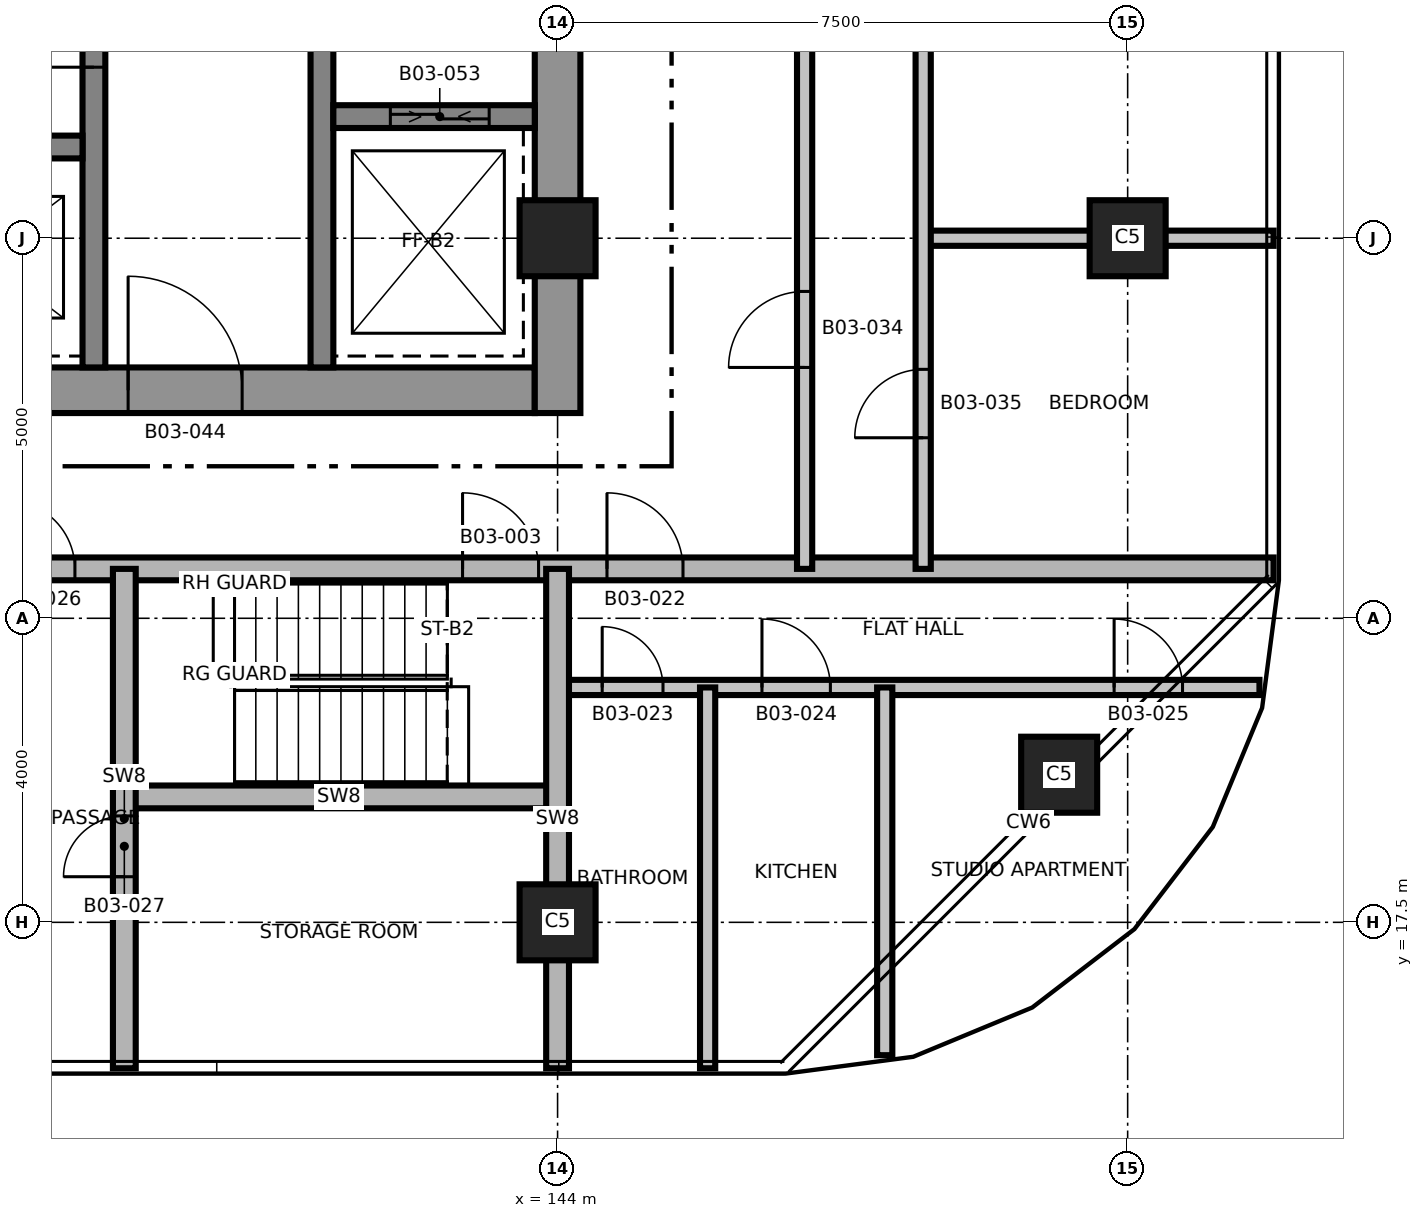
"""IFC4 building model, lengths in metres.
Left out: names, types, materials, properties, quantities, classifications, styles, units other than length and angle.
Written with IfcOpenShell. Run it as: python <this file> out.ifc"""

import sys

from ifc_helpers import new_model, si_unit, direction, frame, frame_2d, origin, origin_2d, place, context, subcontext, project, spatial, rectangle, extrude, element, fill, save


model = new_model("IFC4")
c1 = context("Model", 3, precision=1e-05, world=origin(), true_north=direction((0.0, 1.0)))
c2 = subcontext(c1, "Body", "Model", "MODEL_VIEW")
j1 = project(units=[si_unit("LENGTHUNIT", "METRE"), si_unit("PLANEANGLEUNIT", "RADIAN")], contexts=[c1])
p1 = place(None, origin())
s1 = spatial("IfcSite", under=j1, at=p1, CompositionType="ELEMENT")
p2 = place(p1, origin())
s2 = spatial("IfcBuilding", under=s1, at=p2, CompositionType="ELEMENT")
p3 = place(p2, frame((0.0, 0.0, 55.7)))
s3 = spatial("IfcBuildingStorey", under=s2, at=p3, CompositionType="ELEMENT", Elevation=55.7)
p4 = place(p3, frame((128.7, 24.5, 0.0), z_axis=(0.0, 0.0, 1.0), x_axis=(1.0, 0.0, 0.0)))
e1 = element("IfcWall", 1, at=p4, inside=s3, PredefinedType="SHEAR", context=c2, shape_type="SweptSolid", body=[
    extrude(rectangle(XDim=15.0, YDim=0.6, at=frame_2d((7.5, 0.0))), origin(), (0.0, 0.0, 1.0), 3.7),
])
p5 = place(p4, frame((9.65, 0.0, 0.0)))
e2 = element("IfcOpeningElement", 2, at=p5, cuts=e1, PredefinedType="OPENING", context=c2, shape_type="SweptSolid", body=[
    extrude(rectangle(XDim=1.5, YDim=2.1, at=frame_2d((0.75, 1.05))), frame((0.0, 0.31, 0.0), z_axis=(0.0, -1.0, 0.0), x_axis=(1.0, 0.0, 0.0)), (0.0, 0.0, 1.0), 0.62),
])
p6 = place(p4, frame((1.25, 0.0, 0.0)))
e3 = element("IfcOpeningElement", 3, at=p6, cuts=e1, PredefinedType="OPENING", context=c2, shape_type="SweptSolid", body=[
    extrude(rectangle(XDim=0.9, YDim=2.1, at=frame_2d((0.45, 1.05))), frame((0.0, 0.31, 0.0), z_axis=(0.0, -1.0, 0.0), x_axis=(1.0, 0.0, 0.0)), (0.0, 0.0, 1.0), 0.62),
])
p7 = place(p3, frame((144.0, 24.2, 0.0), z_axis=(0.0, 0.0, 1.0), x_axis=(0.0, 1.0, 0.0)))
e4 = element("IfcWall", 4, at=p7, inside=s3, PredefinedType="SHEAR", context=c2, shape_type="SweptSolid", body=[
    extrude(rectangle(XDim=13.6, YDim=0.6, at=frame_2d((6.8, 0.0))), origin(), (0.0, 0.0, 1.0), 3.7),
])
p8 = place(p3, frame((137.9, 24.8, 0.0), z_axis=(0.0, 0.0, 1.0), x_axis=(0.0, 1.0, 0.0)))
e5 = element("IfcWall", 5, at=p8, inside=s3, PredefinedType="SHEAR", context=c2, shape_type="SweptSolid", body=[
    extrude(rectangle(XDim=12.4, YDim=0.3, at=frame_2d((6.2, 0.0))), origin(), (0.0, 0.0, 1.0), 3.7),
])
p9 = place(p8, frame((3.95, 0.0, 0.0)))
e6 = element("IfcOpeningElement", 6, at=p9, cuts=e5, PredefinedType="OPENING", context=c2, shape_type="SweptSolid", body=[
    extrude(rectangle(XDim=1.5, YDim=2.1, at=frame_2d((0.75, 1.05))), frame((0.0, 0.16, 0.0), z_axis=(0.0, -1.0, 0.0), x_axis=(1.0, 0.0, 0.0)), (0.0, 0.0, 1.0), 0.32),
])
p10 = place(p8, frame((10.45, 0.0, 0.0)))
e7 = element("IfcOpeningElement", 7, at=p10, cuts=e5, PredefinedType="OPENING", context=c2, shape_type="SweptSolid", body=[
    extrude(rectangle(XDim=0.9, YDim=2.1, at=frame_2d((0.45, 1.05))), frame((0.0, 0.16, 0.0), z_axis=(0.0, -1.0, 0.0), x_axis=(1.0, 0.0, 0.0)), (0.0, 0.0, 1.0), 0.32),
])
p11 = place(p3, frame((140.9, 24.8, 0.0), z_axis=(0.0, 0.0, 1.0), x_axis=(0.0, 1.0, 0.0)))
e8 = element("IfcWall", 8, at=p11, inside=s3, PredefinedType="SHEAR", context=c2, shape_type="SweptSolid", body=[
    extrude(rectangle(XDim=12.4, YDim=0.3, at=frame_2d((6.2, 0.0))), origin(), (0.0, 0.0, 1.0), 3.7),
])
p12 = place(p11, frame((5.9, 0.0, 0.0)))
e9 = element("IfcOpeningElement", 9, at=p12, cuts=e8, PredefinedType="OPENING", context=c2, shape_type="SweptSolid", body=[
    extrude(rectangle(XDim=1.2, YDim=2.1, at=frame_2d((0.6, 1.05))), frame((0.0, 0.16, 0.0), z_axis=(0.0, -1.0, 0.0), x_axis=(1.0, 0.0, 0.0)), (0.0, 0.0, 1.0), 0.32),
])
p13 = place(p3, frame((132.25, 27.7, 0.0), z_axis=(0.0, 0.0, 1.0), x_axis=(1.0, 0.0, 0.0)))
e10 = element("IfcWall", 10, at=p13, inside=s3, PredefinedType="SHEAR", context=c2, shape_type="SweptSolid", body=[
    extrude(rectangle(XDim=5.5, YDim=0.3, at=frame_2d((2.75, 0.0))), origin(), (0.0, 0.0, 1.0), 3.7),
])
p14 = place(p13, frame((0.9, 0.0, 0.0)))
e11 = element("IfcOpeningElement", 11, at=p14, cuts=e10, PredefinedType="OPENING", context=c2, shape_type="SweptSolid", body=[
    extrude(rectangle(XDim=1.1, YDim=2.4, at=frame_2d((0.55, 1.2))), frame((0.0, 0.16, 0.0), z_axis=(0.0, -1.0, 0.0), x_axis=(1.0, 0.0, 0.0)), (0.0, 0.0, 1.0), 0.32),
])
p15 = place(p13, frame((3.8, 0.0, 0.0)))
e12 = element("IfcOpeningElement", 12, at=p15, cuts=e10, PredefinedType="OPENING", context=c2, shape_type="SweptSolid", body=[
    extrude(rectangle(XDim=1.1, YDim=2.4, at=frame_2d((0.55, 1.2))), frame((0.0, 0.16, 0.0), z_axis=(0.0, -1.0, 0.0), x_axis=(1.0, 0.0, 0.0)), (0.0, 0.0, 1.0), 0.32),
])
p16 = place(p3, frame((141.05, 28.1, 0.0), z_axis=(0.0, 0.0, 1.0), x_axis=(1.0, 0.0, 0.0)))
e13 = element("IfcWall", 13, at=p16, inside=s3, PredefinedType="SHEAR", context=c2, shape_type="SweptSolid", body=[
    extrude(rectangle(XDim=2.65, YDim=0.3, at=frame_2d((1.325, 0.0))), origin(), (0.0, 0.0, 1.0), 3.7),
])
p17 = place(p16, frame((0.75, 0.0, 0.0)))
e14 = element("IfcOpeningElement", 14, at=p17, cuts=e13, PredefinedType="OPENING", context=c2, shape_type="SweptSolid", body=[
    extrude(rectangle(XDim=1.3, YDim=2.4, at=frame_2d((0.65, 1.2))), frame((0.0, 0.16, 0.0), z_axis=(0.0, -1.0, 0.0), x_axis=(1.0, 0.0, 0.0)), (0.0, 0.0, 1.0), 0.32),
])
for number, where, z_axis, x_axis in (
    (15, (144.0, 17.5, 0.0), (0.0, 0.0, 1.0), (1.0, 0.0, 0.0)),
    (16, (150.599, 19.442, 0.0), (0.0, 0.0, 1.0), (1.0, 0.0, 0.0)),
    (17, (144.0, 26.5, 0.0), (0.0, 0.0, 1.0), (1.0, 0.0, 0.0)),
    (18, (151.5, 26.5, 0.0), (0.0, 0.0, 1.0), (1.0, 0.0, 0.0)),
):
    element("IfcColumn", number, at=place(p3, frame(where, z_axis=z_axis, x_axis=x_axis)), inside=s3, PredefinedType="COLUMN", context=c2, shape_type="SweptSolid", body=[
        extrude(rectangle(XDim=1.0, YDim=1.0, at=origin_2d()), origin(), (0.0, 0.0, 1.0), 3.7),
    ])
p18 = place(p3, frame((138.25, 19.15, 0.0), z_axis=(0.0, 0.0, 1.0), x_axis=(1.0, 0.0, 0.0)))
e19 = element("IfcWall", 19, at=p18, inside=s3, PredefinedType="SHEAR", context=c2, shape_type="SweptSolid", body=[
    extrude(rectangle(XDim=5.75, YDim=0.3, at=frame_2d((2.875, 0.0))), origin(), (0.0, 0.0, 1.0), 3.4),
])
p19 = place(p3, frame((144.0, 20.59, 0.0), z_axis=(0.0, 0.0, 1.0), x_axis=(1.0, 0.0, 0.0)))
e20 = element("IfcWall", 20, at=p19, inside=s3, PredefinedType="PARTITIONING", context=c2, shape_type="SweptSolid", body=[
    extrude(rectangle(XDim=9.234, YDim=0.2, at=frame_2d((4.617, 0.0))), origin(), (0.0, 0.0, 1.0), 3.4),
])
p20 = place(p19, frame((0.587, 0.0, 0.0)))
e21 = element("IfcOpeningElement", 21, at=p20, cuts=e20, PredefinedType="OPENING", context=c2, shape_type="SweptSolid", body=[
    extrude(rectangle(XDim=0.8, YDim=2.1, at=frame_2d((0.4, 1.05))), frame((0.0, 0.11, 0.0), z_axis=(0.0, -1.0, 0.0), x_axis=(1.0, 0.0, 0.0)), (0.0, 0.0, 1.0), 0.22),
])
p21 = place(p19, frame((2.689, 0.0, 0.0)))
e22 = element("IfcOpeningElement", 22, at=p21, cuts=e20, PredefinedType="OPENING", context=c2, shape_type="SweptSolid", body=[
    extrude(rectangle(XDim=0.9, YDim=2.1, at=frame_2d((0.45, 1.05))), frame((0.0, 0.11, 0.0), z_axis=(0.0, -1.0, 0.0), x_axis=(1.0, 0.0, 0.0)), (0.0, 0.0, 1.0), 0.22),
])
p22 = place(p19, frame((7.322, 0.0, 0.0)))
e23 = element("IfcOpeningElement", 23, at=p22, cuts=e20, PredefinedType="OPENING", context=c2, shape_type="SweptSolid", body=[
    extrude(rectangle(XDim=0.9, YDim=2.1, at=frame_2d((0.45, 1.05))), frame((0.0, 0.11, 0.0), z_axis=(0.0, -1.0, 0.0), x_axis=(1.0, 0.0, 0.0)), (0.0, 0.0, 1.0), 0.22),
])
p23 = place(p3, frame((119.58, 22.15, 0.0), z_axis=(0.0, 0.0, 1.0), x_axis=(1.0, 0.0, 0.0)))
e24 = element("IfcWall", 24, at=p23, inside=s3, PredefinedType="SHEAR", context=c2, shape_type="SweptSolid", body=[
    extrude(rectangle(XDim=33.84, YDim=0.3, at=frame_2d((16.92, 0.0))), origin(), (0.0, 0.0, 1.0), 3.4),
])
p24 = place(p23, frame((23.17, 0.0, 0.0)))
e25 = element("IfcOpeningElement", 25, at=p24, cuts=e24, PredefinedType="OPENING", context=c2, shape_type="SweptSolid", body=[
    extrude(rectangle(XDim=1.0, YDim=2.1, at=frame_2d((0.5, 1.05))), frame((0.0, 0.16, 0.0), z_axis=(0.0, -1.0, 0.0), x_axis=(1.0, 0.0, 0.0)), (0.0, 0.0, 1.0), 0.32),
])
p25 = place(p23, frame((11.52, 0.0, 0.0)))
e26 = element("IfcOpeningElement", 26, at=p25, cuts=e24, PredefinedType="OPENING", context=c2, shape_type="SweptSolid", body=[
    extrude(rectangle(XDim=1.0, YDim=2.1, at=frame_2d((0.5, 1.05))), frame((0.0, 0.16, 0.0), z_axis=(0.0, -1.0, 0.0), x_axis=(1.0, 0.0, 0.0)), (0.0, 0.0, 1.0), 0.32),
])
p26 = place(p23, frame((25.07, 0.0, 0.0)))
e27 = element("IfcOpeningElement", 27, at=p26, cuts=e24, PredefinedType="OPENING", context=c2, shape_type="SweptSolid", body=[
    extrude(rectangle(XDim=1.0, YDim=2.1, at=frame_2d((0.5, 1.05))), frame((0.0, 0.16, 0.0), z_axis=(0.0, -1.0, 0.0), x_axis=(1.0, 0.0, 0.0)), (0.0, 0.0, 1.0), 0.32),
])
p27 = place(p23, frame((17.17, 0.0, 0.0)))
e28 = element("IfcOpeningElement", 28, at=p27, cuts=e24, PredefinedType="OPENING", context=c2, shape_type="SweptSolid", body=[
    extrude(rectangle(XDim=0.9, YDim=2.1, at=frame_2d((0.45, 1.05))), frame((0.0, 0.16, 0.0), z_axis=(0.0, -1.0, 0.0), x_axis=(1.0, 0.0, 0.0)), (0.0, 0.0, 1.0), 0.32),
])
p28 = place(p3, frame((148.81, 26.5, 0.0), z_axis=(0.0, 0.0, 1.0), x_axis=(1.0, 0.0, 0.0)))
e29 = element("IfcWall", 29, at=p28, inside=s3, PredefinedType="PARTITIONING", context=c2, shape_type="SweptSolid", body=[
    extrude(rectangle(XDim=4.61, YDim=0.2, at=frame_2d((2.305, 0.0))), origin(), (0.0, 0.0, 1.0), 3.4),
])
p29 = place(p3, frame((138.3, 15.58, 0.0), z_axis=(0.0, 0.0, 1.0), x_axis=(0.0, 1.0, 0.0)))
e30 = element("IfcWall", 30, at=p29, inside=s3, PredefinedType="SHEAR", context=c2, shape_type="SweptSolid", body=[
    extrude(rectangle(XDim=6.57, YDim=0.3, at=frame_2d((3.285, 0.0))), origin(), (0.0, 0.0, 1.0), 3.4),
])
p30 = place(p29, frame((2.52, 0.0, 0.0)))
e31 = element("IfcOpeningElement", 31, at=p30, cuts=e30, PredefinedType="OPENING", context=c2, shape_type="SweptSolid", body=[
    extrude(rectangle(XDim=0.8, YDim=2.1, at=frame_2d((0.4, 1.05))), frame((0.0, 0.16, 0.0), z_axis=(0.0, -1.0, 0.0), x_axis=(1.0, 0.0, 0.0)), (0.0, 0.0, 1.0), 0.32),
])
p31 = place(p3, frame((144.0, 15.58, 0.0), z_axis=(0.0, 0.0, 1.0), x_axis=(0.0, 1.0, 0.0)))
e32 = element("IfcWall", 32, at=p31, inside=s3, PredefinedType="SHEAR", context=c2, shape_type="SweptSolid", body=[
    extrude(rectangle(XDim=6.57, YDim=0.3, at=frame_2d((3.285, 0.0))), origin(), (0.0, 0.0, 1.0), 3.4),
])
p32 = place(p3, frame((145.974, 15.58, 0.0), z_axis=(0.0, 0.0, 1.0), x_axis=(0.0, 1.0, 0.0)))
e33 = element("IfcWall", 33, at=p32, inside=s3, PredefinedType="PARTITIONING", context=c2, shape_type="SweptSolid", body=[
    extrude(rectangle(XDim=5.01, YDim=0.2, at=frame_2d((2.505, 0.0))), origin(), (0.0, 0.0, 1.0), 3.4),
])
p33 = place(p3, frame((147.25, 22.15, 0.0), z_axis=(0.0, 0.0, 1.0), x_axis=(0.0, 1.0, 0.0)))
e34 = element("IfcWall", 34, at=p33, inside=s3, PredefinedType="PARTITIONING", context=c2, shape_type="SweptSolid", body=[
    extrude(rectangle(XDim=17.7, YDim=0.2, at=frame_2d((8.85, 0.0))), origin(), (0.0, 0.0, 1.0), 3.4),
])
p34 = place(p33, frame((2.65, 0.0, 0.0)))
e35 = element("IfcOpeningElement", 35, at=p34, cuts=e34, PredefinedType="OPENING", context=c2, shape_type="SweptSolid", body=[
    extrude(rectangle(XDim=1.0, YDim=2.1, at=frame_2d((0.5, 1.05))), frame((0.0, 0.11, 0.0), z_axis=(0.0, -1.0, 0.0), x_axis=(1.0, 0.0, 0.0)), (0.0, 0.0, 1.0), 0.22),
])
p35 = place(p3, frame((148.304, 15.752, 0.0), z_axis=(0.0, 0.0, 1.0), x_axis=(0.0, 1.0, 0.0)))
e36 = element("IfcWall", 36, at=p35, inside=s3, PredefinedType="PARTITIONING", context=c2, shape_type="SweptSolid", body=[
    extrude(rectangle(XDim=4.838, YDim=0.2, at=frame_2d((2.419, 0.0))), origin(), (0.0, 0.0, 1.0), 3.4),
])
p36 = place(p3, frame((148.81, 22.15, 0.0), z_axis=(0.0, 0.0, 1.0), x_axis=(0.0, 1.0, 0.0)))
e37 = element("IfcWall", 37, at=p36, inside=s3, PredefinedType="PARTITIONING", context=c2, shape_type="SweptSolid", body=[
    extrude(rectangle(XDim=17.7, YDim=0.2, at=frame_2d((8.85, 0.0))), origin(), (0.0, 0.0, 1.0), 3.4),
])
p37 = place(p36, frame((1.725, 0.0, 0.0)))
e38 = element("IfcOpeningElement", 38, at=p37, cuts=e37, PredefinedType="OPENING", context=c2, shape_type="SweptSolid", body=[
    extrude(rectangle(XDim=0.9, YDim=2.1, at=frame_2d((0.45, 1.05))), frame((0.0, 0.11, 0.0), z_axis=(0.0, -1.0, 0.0), x_axis=(1.0, 0.0, 0.0)), (0.0, 0.0, 1.0), 0.22),
])
p38 = place(p36, frame((6.867, 0.0, 0.0)))
e39 = element("IfcOpeningElement", 39, at=p38, cuts=e37, PredefinedType="OPENING", context=c2, shape_type="SweptSolid", body=[
    extrude(rectangle(XDim=0.9, YDim=2.1, at=frame_2d((0.45, 1.05))), frame((0.0, 0.11, 0.0), z_axis=(0.0, -1.0, 0.0), x_axis=(1.0, 0.0, 0.0)), (0.0, 0.0, 1.0), 0.22),
])
p39 = place(p36, frame((11.367, 0.0, 0.0)))
e40 = element("IfcOpeningElement", 40, at=p39, cuts=e37, PredefinedType="OPENING", context=c2, shape_type="SweptSolid", body=[
    extrude(rectangle(XDim=0.9, YDim=2.1, at=frame_2d((0.45, 1.05))), frame((0.0, 0.11, 0.0), z_axis=(0.0, -1.0, 0.0), x_axis=(1.0, 0.0, 0.0)), (0.0, 0.0, 1.0), 0.22),
])
p40 = place(p36, frame((14.378, 0.0, 0.0)))
e41 = element("IfcOpeningElement", 41, at=p40, cuts=e37, PredefinedType="OPENING", context=c2, shape_type="SweptSolid", body=[
    extrude(rectangle(XDim=0.9, YDim=2.1, at=frame_2d((0.45, 1.05))), frame((0.0, 0.11, 0.0), z_axis=(0.0, -1.0, 0.0), x_axis=(1.0, 0.0, 0.0)), (0.0, 0.0, 1.0), 0.22),
])
p41 = place(p36, frame((16.603, 0.0, 0.0)))
e42 = element("IfcOpeningElement", 42, at=p41, cuts=e37, PredefinedType="OPENING", context=c2, shape_type="SweptSolid", body=[
    extrude(rectangle(XDim=0.8, YDim=2.1, at=frame_2d((0.4, 1.05))), frame((0.0, 0.11, 0.0), z_axis=(0.0, -1.0, 0.0), x_axis=(1.0, 0.0, 0.0)), (0.0, 0.0, 1.0), 0.22),
])
p42 = place(p24, origin())
e43 = element("IfcDoor", 43, at=p42, inside=s3, OperationType="SINGLE_SWING_LEFT", PredefinedType="DOOR", context=c2, shape_type="SweptSolid", body=[
    extrude(rectangle(XDim=1.0, YDim=2.1, at=frame_2d((0.5, 1.05))), frame((0.0, 0.025, 0.0), z_axis=(0.0, -1.0, 0.0), x_axis=(1.0, 0.0, 0.0)), (0.0, 0.0, 1.0), 0.05),
])
fill(e25, e43)
p43 = place(p26, origin())
e44 = element("IfcDoor", 44, at=p43, inside=s3, OperationType="SINGLE_SWING_RIGHT", PredefinedType="DOOR", context=c2, shape_type="SweptSolid", body=[
    extrude(rectangle(XDim=1.0, YDim=2.1, at=frame_2d((0.5, 1.05))), frame((0.0, 0.025, 0.0), z_axis=(0.0, -1.0, 0.0), x_axis=(1.0, 0.0, 0.0)), (0.0, 0.0, 1.0), 0.05),
])
fill(e27, e44)
p44 = place(p20, origin())
e45 = element("IfcDoor", 45, at=p44, inside=s3, OperationType="SINGLE_SWING_LEFT", PredefinedType="DOOR", context=c2, shape_type="SweptSolid", body=[
    extrude(rectangle(XDim=0.8, YDim=2.1, at=frame_2d((0.4, 1.05))), frame((0.0, 0.025, 0.0), z_axis=(0.0, -1.0, 0.0), x_axis=(1.0, 0.0, 0.0)), (0.0, 0.0, 1.0), 0.05),
])
fill(e21, e45)
p45 = place(p21, origin())
e46 = element("IfcDoor", 46, at=p45, inside=s3, OperationType="SINGLE_SWING_RIGHT", PredefinedType="DOOR", context=c2, shape_type="SweptSolid", body=[
    extrude(rectangle(XDim=0.9, YDim=2.1, at=frame_2d((0.45, 1.05))), frame((0.0, 0.025, 0.0), z_axis=(0.0, -1.0, 0.0), x_axis=(1.0, 0.0, 0.0)), (0.0, 0.0, 1.0), 0.05),
])
fill(e22, e46)
p46 = place(p22, origin())
e47 = element("IfcDoor", 47, at=p46, inside=s3, OperationType="SINGLE_SWING_LEFT", PredefinedType="DOOR", context=c2, shape_type="SweptSolid", body=[
    extrude(rectangle(XDim=0.9, YDim=2.1, at=frame_2d((0.45, 1.05))), frame((0.0, 0.025, 0.0), z_axis=(0.0, -1.0, 0.0), x_axis=(1.0, 0.0, 0.0)), (0.0, 0.0, 1.0), 0.05),
])
fill(e23, e47)
p47 = place(p27, origin())
e48 = element("IfcDoor", 48, at=p47, inside=s3, OperationType="SINGLE_SWING_RIGHT", PredefinedType="DOOR", context=c2, shape_type="SweptSolid", body=[
    extrude(rectangle(XDim=0.9, YDim=2.1, at=frame_2d((0.45, 1.05))), frame((0.0, 0.025, 0.0), z_axis=(0.0, -1.0, 0.0), x_axis=(1.0, 0.0, 0.0)), (0.0, 0.0, 1.0), 0.05),
])
fill(e28, e48)
p48 = place(p30, origin())
e49 = element("IfcDoor", 49, at=p48, inside=s3, OperationType="SINGLE_SWING_LEFT", PredefinedType="DOOR", context=c2, shape_type="SweptSolid", body=[
    extrude(rectangle(XDim=0.8, YDim=2.1, at=frame_2d((0.4, 1.05))), frame((0.0, 0.025, 0.0), z_axis=(0.0, -1.0, 0.0), x_axis=(1.0, 0.0, 0.0)), (0.0, 0.0, 1.0), 0.05),
])
fill(e31, e49)
p49 = place(p34, origin())
e50 = element("IfcDoor", 50, at=p49, inside=s3, OperationType="SINGLE_SWING_RIGHT", PredefinedType="DOOR", context=c2, shape_type="SweptSolid", body=[
    extrude(rectangle(XDim=1.0, YDim=2.1, at=frame_2d((0.5, 1.05))), frame((0.0, 0.025, 0.0), z_axis=(0.0, -1.0, 0.0), x_axis=(1.0, 0.0, 0.0)), (0.0, 0.0, 1.0), 0.05),
])
fill(e35, e50)
p50 = place(p37, origin())
e51 = element("IfcDoor", 51, at=p50, inside=s3, OperationType="SINGLE_SWING_LEFT", PredefinedType="DOOR", context=c2, shape_type="SweptSolid", body=[
    extrude(rectangle(XDim=0.9, YDim=2.1, at=frame_2d((0.45, 1.05))), frame((0.0, 0.025, 0.0), z_axis=(0.0, -1.0, 0.0), x_axis=(1.0, 0.0, 0.0)), (0.0, 0.0, 1.0), 0.05),
])
fill(e38, e51)
p51 = place(p9, origin())
e52 = element("IfcDoor", 52, at=p51, inside=s3, OperationType="SINGLE_SWING_RIGHT", PredefinedType="DOOR", context=c2, shape_type="SweptSolid", body=[
    extrude(rectangle(XDim=1.5, YDim=2.1, at=frame_2d((0.75, 1.05))), frame((0.0, 0.025, 0.0), z_axis=(0.0, -1.0, 0.0), x_axis=(1.0, 0.0, 0.0)), (0.0, 0.0, 1.0), 0.05),
])
fill(e6, e52)
p52 = place(p5, origin())
e53 = element("IfcDoor", 53, at=p52, inside=s3, OperationType="SINGLE_SWING_LEFT", PredefinedType="DOOR", context=c2, shape_type="SweptSolid", body=[
    extrude(rectangle(XDim=1.5, YDim=2.1, at=frame_2d((0.75, 1.05))), frame((0.0, 0.025, 0.0), z_axis=(0.0, -1.0, 0.0), x_axis=(1.0, 0.0, 0.0)), (0.0, 0.0, 1.0), 0.05),
])
fill(e2, e53)
p53 = place(p17, origin())
e54 = element("IfcDoor", 54, at=p53, inside=s3, OperationType="SLIDING_TO_LEFT", PredefinedType="DOOR", context=c2, shape_type="SweptSolid", body=[
    extrude(rectangle(XDim=1.3, YDim=2.4, at=frame_2d((0.65, 1.2))), frame((0.0, 0.025, 0.0), z_axis=(0.0, -1.0, 0.0), x_axis=(1.0, 0.0, 0.0)), (0.0, 0.0, 1.0), 0.05),
])
fill(e14, e54)
save(model, sys.argv[1])
